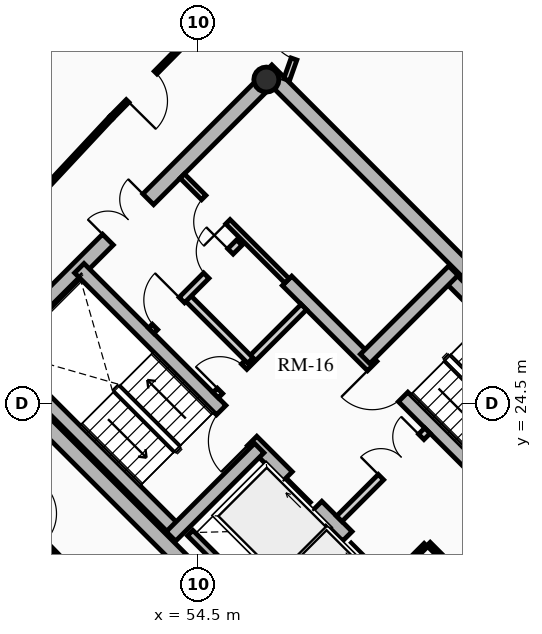
"""IFC4 building model, lengths in metres.
Left out: names, types, materials, properties, quantities, classifications, styles, units other than length and angle.
Written with IfcOpenShell. Run it as: python <this file> out.ifc"""

import sys

from ifc_helpers import new_model, si_unit, direction, frame, frame_2d, origin, origin_2d, place, context, subcontext, project, spatial, rectangle, hollow_circle, extrude, source, transform, mapped, element, fill, save


model = new_model("IFC4")
c1 = context("Model", 3, precision=1e-05, world=origin(), true_north=direction((0.0, 1.0)))
c2 = subcontext(c1, "Body", "Model", "MODEL_VIEW")
j1 = project(units=[si_unit("LENGTHUNIT", "METRE"), si_unit("PLANEANGLEUNIT", "RADIAN")], contexts=[c1])
p1 = place(None, origin())
s1 = spatial("IfcSite", under=j1, at=p1, CompositionType="ELEMENT")
p2 = place(p1, origin())
s2 = spatial("IfcBuilding", under=s1, at=p2, CompositionType="ELEMENT")
p3 = place(p2, frame((0.0, 0.0, 196.66)))
s3 = spatial("IfcBuildingStorey", under=s2, at=p3, CompositionType="ELEMENT", Elevation=196.66)
for number, where, z_axis, x_axis in (
    (1, (58.702, 15.732, 0.0), (0.0, 0.0, 1.0), (-0.707, 0.707, 0.0)),
    (2, (66.268, 23.298, 0.0), (0.0, 0.0, 1.0), (-0.707, 0.707, 0.0)),
):
    element("IfcWall", number, at=place(p3, frame(where, z_axis=z_axis, x_axis=x_axis)), inside=s3, PredefinedType="SHEAR", context=c2, shape_type="SweptSolid", body=[
        extrude(rectangle(XDim=14.1, YDim=0.4, at=frame_2d((7.05, 0.0))), origin(), (0.0, 0.0, 1.0), 2.91),
    ])
p4 = place(p3, frame((58.561, 15.873, 0.0), z_axis=(0.0, 0.0, 1.0), x_axis=(0.707106781187, 0.707106781187, 0.0)))
e3 = element("IfcWall", 3, at=p4, inside=s3, PredefinedType="SHEAR", context=c2, shape_type="SweptSolid", body=[
    extrude(rectangle(XDim=10.7, YDim=0.4, at=frame_2d((5.35, 0.0))), origin(), (0.0, 0.0, 1.0), 2.91),
])
m1 = source(origin(), c2, "Body", "SweptSolid", [
    extrude(rectangle(XDim=1.5, YDim=2.02, at=frame_2d((0.75, 1.01))), frame((0.0, 0.21, 0.0), z_axis=(0.0, -1.0, 0.0), x_axis=(1.0, 0.0, 0.0)), (0.0, 0.0, 1.0), 0.42),
])
p5 = place(p4, frame((5.45, 0.0, 0.0)))
e4 = element("IfcOpeningElement", 4, at=p5, cuts=e3, PredefinedType="OPENING", context=c2, shape_type="MappedRepresentation", body=[
    mapped(m1, transform((0.0, 0.0, 0.0), x_axis=(1.0, 0.0, 0.0), y_axis=(0.0, 1.0, 0.0), z_axis=(0.0, 0.0, 1.0), scale=1.0)),
])
p6 = place(p3, frame((48.873, 25.561, 0.0), z_axis=(0.0, 0.0, 1.0), x_axis=(0.707106781187, 0.707106781187, 0.0)))
e5 = element("IfcWall", 5, at=p6, inside=s3, PredefinedType="SHEAR", context=c2, shape_type="SweptSolid", body=[
    extrude(rectangle(XDim=10.7, YDim=0.4, at=frame_2d((5.35, 0.0))), origin(), (0.0, 0.0, 1.0), 2.91),
])
p7 = place(p6, frame((4.6, 0.0, 0.0)))
e6 = element("IfcOpeningElement", 6, at=p7, cuts=e5, PredefinedType="OPENING", context=c2, shape_type="MappedRepresentation", body=[
    mapped(m1, transform((0.0, 0.0, 0.0), x_axis=(1.0, 0.0, 0.0), y_axis=(0.0, 1.0, 0.0), z_axis=(0.0, 0.0, 1.0), scale=1.0)),
])
p8 = place(p3, frame((61.06, 18.373, 0.0), z_axis=(0.0, 0.0, 1.0), x_axis=(-0.707106781187, 0.707106781187, 0.0)))
e7 = element("IfcWall", 7, at=p8, inside=s3, PredefinedType="SHEAR", context=c2, shape_type="SweptSolid", body=[
    extrude(rectangle(XDim=13.7, YDim=0.35, at=frame_2d((6.85, 0.0))), origin(), (0.0, 0.0, 1.0), 2.91),
])
m2 = source(origin(), c2, "Body", "SweptSolid", [
    extrude(rectangle(XDim=1.1, YDim=2.015, at=frame_2d((0.55, 1.007))), frame((0.0, 0.185, 0.0), z_axis=(0.0, -1.0, 0.0), x_axis=(1.0, 0.0, 0.0)), (0.0, 0.0, 1.0), 0.37),
])
p9 = place(p8, frame((4.85, 0.0, 0.0)))
e8 = element("IfcOpeningElement", 8, at=p9, cuts=e7, PredefinedType="OPENING", context=c2, shape_type="MappedRepresentation", body=[
    mapped(m2, transform((0.0, 0.0, 0.0), x_axis=(1.0, 0.0, 0.0), y_axis=(0.0, 1.0, 0.0), z_axis=(0.0, 0.0, 1.0), scale=1.0)),
])
p10 = place(p8, frame((0.625, 0.0, 0.0)))
e9 = element("IfcOpeningElement", 9, at=p10, cuts=e7, PredefinedType="OPENING", context=c2, shape_type="MappedRepresentation", body=[
    mapped(m2, transform((0.0, 0.0, 0.0), x_axis=(1.0, 0.0, 0.0), y_axis=(0.0, 1.0, 0.0), z_axis=(0.0, 0.0, 1.0), scale=1.0)),
])
p11 = place(p8, frame((2.625, 0.0, 0.0)))
e10 = element("IfcOpeningElement", 10, at=p11, cuts=e7, PredefinedType="OPENING", context=c2, shape_type="MappedRepresentation", body=[
    mapped(m2, transform((0.0, 0.0, 0.0), x_axis=(1.0, 0.0, 0.0), y_axis=(0.0, 1.0, 0.0), z_axis=(0.0, 0.0, 1.0), scale=1.0)),
])
m3 = source(origin(), c2, "Body", "SweptSolid", [
    extrude(rectangle(XDim=1.15, YDim=2.02, at=frame_2d((0.575, 1.01))), frame((0.0, 0.185, 0.0), z_axis=(0.0, -1.0, 0.0), x_axis=(1.0, 0.0, 0.0)), (0.0, 0.0, 1.0), 0.37),
])
p12 = place(p8, frame((7.27, 0.0, 0.0)))
e11 = element("IfcOpeningElement", 11, at=p12, cuts=e7, PredefinedType="OPENING", context=c2, shape_type="MappedRepresentation", body=[
    mapped(m3, transform((0.0, 0.0, 0.0), x_axis=(1.0, 0.0, 0.0), y_axis=(0.0, 1.0, 0.0), z_axis=(0.0, 0.0, 1.0), scale=1.0)),
])
p13 = place(p3, frame((63.627, 20.94, 0.0), z_axis=(0.0, 0.0, 1.0), x_axis=(-0.707119496762, 0.707094065383, 0.0)))
e12 = element("IfcWall", 12, at=p13, inside=s3, PredefinedType="SHEAR", context=c2, shape_type="SweptSolid", body=[
    extrude(rectangle(XDim=9.6, YDim=0.35, at=frame_2d((4.8, 0.0))), origin(), (0.0, 0.0, 1.0), 2.91),
])
p14 = place(p13, frame((5.28, 0.0, 0.0)))
e13 = element("IfcOpeningElement", 13, at=p14, cuts=e12, PredefinedType="OPENING", context=c2, shape_type="MappedRepresentation", body=[
    mapped(m3, transform((0.0, 0.0, 0.0), x_axis=(1.0, 0.0, 0.0), y_axis=(0.0, 1.0, 0.0), z_axis=(0.0, 0.0, 1.0), scale=1.0)),
])
p15 = place(p3, frame((53.922, 21.141, 0.0), z_axis=(0.0, 0.0, 1.0), x_axis=(-0.707106781187, 0.707106781187, 0.0)))
e14 = element("IfcWall", 14, at=p15, inside=s3, PredefinedType="SHEAR", context=c2, shape_type="SweptSolid", body=[
    extrude(rectangle(XDim=6.695, YDim=0.35, at=frame_2d((3.348, 0.0))), origin(), (0.0, 0.0, 1.0), 2.91),
])
p16 = place(p3, frame((53.784, 21.003, 0.0), z_axis=(0.0, 0.0, 1.0), x_axis=(0.707106781187, 0.707106781187, 0.0)))
e15 = element("IfcWall", 15, at=p16, inside=s3, PredefinedType="SHEAR", context=c2, shape_type="SweptSolid", body=[
    extrude(rectangle(XDim=3.285, YDim=0.35, at=frame_2d((1.643, 0.0))), origin(), (0.0, 0.0, 1.0), 2.91),
])
p17 = place(p3, frame((65.812, 23.125, 0.0), z_axis=(0.0, 0.0, 1.0), x_axis=(-0.707106781187, 0.707106781187, 0.0)))
e16 = element("IfcWall", 16, at=p17, inside=s3, PredefinedType="SHEAR", context=c2, shape_type="SweptSolid", body=[
    extrude(rectangle(XDim=6.695, YDim=0.35, at=frame_2d((3.348, 0.0))), origin(), (0.0, 0.0, 1.0), 2.91),
])
p18 = place(p3, frame((58.893, 25.674, 0.0), z_axis=(0.0, 0.0, 1.0), x_axis=(0.707106781187, 0.707106781187, 0.0)))
e17 = element("IfcWall", 17, at=p18, inside=s3, PredefinedType="SHEAR", context=c2, shape_type="SweptSolid", body=[
    extrude(rectangle(XDim=3.285, YDim=0.35, at=frame_2d((1.643, 0.0))), origin(), (0.0, 0.0, 1.0), 2.91),
])
p19 = place(p3, frame((56.294, 33.024, 0.0), z_axis=(0.0, 0.0, 1.0), x_axis=(0.707106781187, 0.707106781187, 0.0)))
e18 = element("IfcColumn", 18, at=p19, inside=s3, PredefinedType="COLUMN", context=c2, shape_type="SweptSolid", body=[
    extrude(hollow_circle(Radius=0.33, WallThickness=0.025, at=origin_2d()), origin(), (0.0, 0.0, 1.0), 2.91),
])
p20 = place(p3, frame((55.888, 19.069, 0.0), z_axis=(0.0, 0.0, 1.0), x_axis=(0.707106781187, 0.707106781187, 0.0)))
e19 = element("IfcWall", 19, at=p20, inside=s3, PredefinedType="SHEAR", context=c2, shape_type="SweptSolid", body=[
    extrude(rectangle(XDim=2.97, YDim=0.2, at=frame_2d((1.485, 0.0))), origin(), (0.0, 0.0, 1.0), 2.91),
])
p21 = place(p3, frame((56.015, 19.366, 0.0), z_axis=(0.0, 0.0, 1.0), x_axis=(-0.707106781187, 0.707106781187, 0.0)))
e20 = element("IfcWall", 20, at=p21, inside=s3, PredefinedType="SHEAR", context=c2, shape_type="SweptSolid", body=[
    extrude(rectangle(XDim=2.44, YDim=0.2, at=frame_2d((1.22, 0.0))), origin(), (0.0, 0.0, 1.0), 2.91),
])
p22 = place(p3, frame((58.214, 21.467, 0.0), z_axis=(0.0, 0.0, 1.0), x_axis=(0.707106781187, 0.707106781187, 0.0)))
e21 = element("IfcWall", 21, at=p22, inside=s3, PredefinedType="PARTITIONING", context=c2, shape_type="SweptSolid", body=[
    extrude(rectangle(XDim=3.28, YDim=0.2, at=frame_2d((1.64, 0.0))), origin(), (0.0, 0.0, 1.0), 2.685),
])
m4 = source(origin(), c2, "Body", "SweptSolid", [
    extrude(rectangle(XDim=1.5, YDim=2.02, at=frame_2d((0.75, 1.01))), frame((0.0, 0.11, 0.0), z_axis=(0.0, -1.0, 0.0), x_axis=(1.0, 0.0, 0.0)), (0.0, 0.0, 1.0), 0.22),
])
p23 = place(p22, frame((1.55, 0.0, 0.0)))
e22 = element("IfcOpeningElement", 22, at=p23, cuts=e21, PredefinedType="OPENING", context=c2, shape_type="MappedRepresentation", body=[
    mapped(m4, transform((0.0, 0.0, 0.0), x_axis=(1.0, 0.0, 0.0), y_axis=(0.0, 1.0, 0.0), z_axis=(0.0, 0.0, 1.0), scale=1.0)),
])
p24 = place(p3, frame((54.961, 24.719, 0.0), z_axis=(0.0, 0.0, 1.0), x_axis=(0.707106781187, 0.707106781187, 0.0)))
e23 = element("IfcWall", 23, at=p24, inside=s3, PredefinedType="PARTITIONING", context=c2, shape_type="SweptSolid", body=[
    extrude(rectangle(XDim=3.28, YDim=0.2, at=frame_2d((1.64, 0.0))), origin(), (0.0, 0.0, 1.0), 2.685),
])
m5 = source(origin(), c2, "Body", "SweptSolid", [
    extrude(rectangle(XDim=0.9, YDim=2.005, at=frame_2d((0.45, 1.002))), frame((0.0, 0.11, 0.0), z_axis=(0.0, -1.0, 0.0), x_axis=(1.0, 0.0, 0.0)), (0.0, 0.0, 1.0), 0.22),
])
p25 = place(p24, frame((0.16, 0.0, 0.0)))
e24 = element("IfcOpeningElement", 24, at=p25, cuts=e23, PredefinedType="OPENING", context=c2, shape_type="MappedRepresentation", body=[
    mapped(m5, transform((0.0, 0.0, 0.0), x_axis=(1.0, 0.0, 0.0), y_axis=(0.0, 1.0, 0.0), z_axis=(0.0, 0.0, 1.0), scale=1.0)),
])
p26 = place(p3, frame((55.874, 25.631, 0.0), z_axis=(0.0, 0.0, 1.0), x_axis=(-0.707157639372, 0.707055919343, 0.0)))
e25 = element("IfcWall", 25, at=p26, inside=s3, PredefinedType="PARTITIONING", context=c2, shape_type="SweptSolid", body=[
    extrude(rectangle(XDim=2.4, YDim=0.2, at=frame_2d((1.2, 0.0))), origin(), (0.0, 0.0, 1.0), 2.685),
])
p27 = place(p3, frame((53.264, 26.416, 0.0), z_axis=(0.0, 0.0, 1.0), x_axis=(0.707106781187, 0.707106781187, 0.0)))
e26 = element("IfcWall", 26, at=p27, inside=s3, PredefinedType="PARTITIONING", context=c2, shape_type="SweptSolid", body=[
    extrude(rectangle(XDim=3.28, YDim=0.2, at=frame_2d((1.64, 0.0))), origin(), (0.0, 0.0, 1.0), 2.685),
])
m6 = source(origin(), c2, "Body", "SweptSolid", [
    extrude(rectangle(XDim=1.0, YDim=2.015, at=frame_2d((0.5, 1.007))), frame((0.0, 0.11, 0.0), z_axis=(0.0, -1.0, 0.0), x_axis=(1.0, 0.0, 0.0)), (0.0, 0.0, 1.0), 0.22),
])
p28 = place(p27, frame((0.14, 0.0, 0.0)))
e27 = element("IfcOpeningElement", 27, at=p28, cuts=e26, PredefinedType="OPENING", context=c2, shape_type="MappedRepresentation", body=[
    mapped(m6, transform((0.0, 0.0, 0.0), x_axis=(1.0, 0.0, 0.0), y_axis=(0.0, 1.0, 0.0), z_axis=(0.0, 0.0, 1.0), scale=1.0)),
])
p29 = place(p27, frame((2.05, 0.0, 0.0)))
e28 = element("IfcOpeningElement", 28, at=p29, cuts=e26, PredefinedType="OPENING", context=c2, shape_type="MappedRepresentation", body=[
    mapped(m5, transform((0.0, 0.0, 0.0), x_axis=(1.0, 0.0, 0.0), y_axis=(0.0, 1.0, 0.0), z_axis=(0.0, 0.0, 1.0), scale=1.0)),
])
p30 = place(p3, frame((61.835, 19.529, 0.0), z_axis=(0.0, 0.0, 1.0), x_axis=(-0.707174592913, 0.707038962956, 0.0)))
e29 = element("IfcWall", 29, at=p30, inside=s3, PredefinedType="PARTITIONING", context=c2, shape_type="SweptSolid", body=[
    extrude(rectangle(XDim=1.8, YDim=0.125, at=frame_2d((0.9, 0.0))), origin(), (0.0, 0.0, 1.0), 2.685),
])
m7 = source(origin(), c2, "Body", "SweptSolid", [
    extrude(rectangle(XDim=0.9, YDim=2.005, at=frame_2d((0.45, 1.002))), frame((0.0, 0.073, 0.0), z_axis=(0.0, -1.0, 0.0), x_axis=(1.0, 0.0, 0.0)), (0.0, 0.0, 1.0), 0.145),
])
p31 = place(p30, frame((0.42, 0.0, 0.0)))
e30 = element("IfcOpeningElement", 30, at=p31, cuts=e29, PredefinedType="OPENING", context=c2, shape_type="MappedRepresentation", body=[
    mapped(m7, transform((0.0, 0.0, 0.0), x_axis=(1.0, 0.0, 0.0), y_axis=(0.0, 1.0, 0.0), z_axis=(0.0, 0.0, 1.0), scale=1.0)),
])
p32 = place(p3, frame((59.713, 19.996, 0.0), z_axis=(0.0, 0.0, 1.0), x_axis=(0.707217726, 0.706995818963, 0.0)))
e31 = element("IfcWall", 31, at=p32, inside=s3, PredefinedType="PARTITIONING", context=c2, shape_type="SweptSolid", body=[
    extrude(rectangle(XDim=1.1, YDim=0.125, at=frame_2d((0.55, 0.0))), origin(), (0.0, 0.0, 1.0), 2.685),
])
p33 = place(p3, frame((56.839, 27.728, 0.0), z_axis=(0.0, 0.0, 1.0), x_axis=(-0.707106781187, 0.707106781187, 0.0)))
e32 = element("IfcWall", 32, at=p33, inside=s3, PredefinedType="PARTITIONING", context=c2, shape_type="SweptSolid", body=[
    extrude(rectangle(XDim=3.9, YDim=0.16, at=frame_2d((1.95, 0.0))), origin(), (0.0, 0.0, 1.0), 2.685),
])
m8 = source(origin(), c2, "Body", "SweptSolid", [
    extrude(rectangle(XDim=0.9, YDim=2.005, at=frame_2d((0.45, 1.002))), frame((0.0, 0.09, 0.0), z_axis=(0.0, -1.0, 0.0), x_axis=(1.0, 0.0, 0.0)), (0.0, 0.0, 1.0), 0.18),
])
p34 = place(p33, frame((2.2, 0.0, 0.0)))
e33 = element("IfcOpeningElement", 33, at=p34, cuts=e32, PredefinedType="OPENING", context=c2, shape_type="MappedRepresentation", body=[
    mapped(m8, transform((0.0, 0.0, 0.0), x_axis=(1.0, 0.0, 0.0), y_axis=(0.0, 1.0, 0.0), z_axis=(0.0, 0.0, 1.0), scale=1.0)),
])
p35 = place(p3, frame((54.506, 34.344, 0.0), z_axis=(0.0, 0.0, 1.0), x_axis=(-0.703053402247, -0.711137056824, 0.0)))
e34 = element("IfcWall", 34, at=p35, inside=s3, PredefinedType="MOVABLE", context=c2, shape_type="SweptSolid", body=[
    extrude(rectangle(XDim=3.262, YDim=0.1, at=frame_2d((1.631, 0.0))), origin(), (0.0, 0.0, 1.0), 2.322),
])
m9 = source(origin(), c2, "Body", "SweptSolid", [
    extrude(rectangle(XDim=1.05, YDim=2.015, at=frame_2d((0.525, 1.007))), frame((0.0, 0.06, 0.0), z_axis=(0.0, -1.0, 0.0), x_axis=(1.0, 0.0, 0.0)), (0.0, 0.0, 1.0), 0.12),
])
p36 = place(p35, frame((1.599, 0.0, 0.0)))
e35 = element("IfcOpeningElement", 35, at=p36, cuts=e34, PredefinedType="OPENING", context=c2, shape_type="MappedRepresentation", body=[
    mapped(m9, transform((0.0, 0.0, 0.0), x_axis=(1.0, 0.0, 0.0), y_axis=(0.0, 1.0, 0.0), z_axis=(0.0, 0.0, 1.0), scale=1.0)),
])
p37 = place(p3, frame((52.212, 32.024, 0.0), z_axis=(0.0, 0.0, 1.0), x_axis=(-0.682158998173, -0.731203871169, 0.0)))
e36 = element("IfcWall", 36, at=p37, inside=s3, PredefinedType="MOVABLE", context=c2, shape_type="SweptSolid", body=[
    extrude(rectangle(XDim=6.282, YDim=0.1, at=frame_2d((3.141, 0.0))), origin(), (0.0, 0.0, 1.0), 2.255),
])
p38 = place(p3, frame((48.052, 23.323, 0.0), z_axis=(0.0, 0.0, 1.0), x_axis=(0.696573981306, -0.717484974454, 0.0)))
e37 = element("IfcWall", 37, at=p38, inside=s3, PredefinedType="MOVABLE", context=c2, shape_type="SweptSolid", body=[
    extrude(rectangle(XDim=5.849, YDim=0.1, at=frame_2d((2.925, 0.0))), origin(), (0.0, 0.0, 1.0), 2.685),
])
p39 = place(p38, frame((2.4, 0.0, 0.0)))
e38 = element("IfcOpeningElement", 38, at=p39, cuts=e37, PredefinedType="OPENING", context=c2, shape_type="MappedRepresentation", body=[
    mapped(m9, transform((0.0, 0.0, 0.0), x_axis=(1.0, 0.0, 0.0), y_axis=(0.0, 1.0, 0.0), z_axis=(0.0, 0.0, 1.0), scale=1.0)),
])
p40 = place(p3, frame((56.828, 33.021, 0.0), z_axis=(0.0, 0.0, 1.0), x_axis=(0.334788446034, 0.942293317605, 0.0)))
e39 = element("IfcWall", 39, at=p40, inside=s3, PredefinedType="PARTITIONING", context=c2, shape_type="SweptSolid", body=[
    extrude(rectangle(XDim=1.829, YDim=0.16, at=frame_2d((0.915, 0.0))), origin(), (0.0, 0.0, 1.0), 2.255),
])
m10 = source(origin(), c2, "Body", "SweptSolid", [
    extrude(rectangle(XDim=1.05, YDim=2.015, at=frame_2d((0.525, 1.007))), frame((0.0, 0.09, 0.0), z_axis=(0.0, -1.0, 0.0), x_axis=(1.0, 0.0, 0.0)), (0.0, 0.0, 1.0), 0.18),
])
p41 = place(p40, frame((0.579, 0.0, 0.0)))
e40 = element("IfcOpeningElement", 40, at=p41, cuts=e39, PredefinedType="OPENING", context=c2, shape_type="MappedRepresentation", body=[
    mapped(m10, transform((0.0, 0.0, 0.0), x_axis=(1.0, 0.0, 0.0), y_axis=(0.0, 1.0, 0.0), z_axis=(0.0, 0.0, 1.0), scale=1.0)),
])
m11 = source(origin(), c2, "Body", "SweptSolid", [
    extrude(rectangle(XDim=1.1, YDim=2.015, at=frame_2d((0.55, 1.007))), frame((0.0, 0.025, 0.0), z_axis=(0.0, -1.0, 0.0), x_axis=(1.0, 0.0, 0.0)), (0.0, 0.0, 1.0), 0.05),
])
p42 = place(p9, origin())
e41 = element("IfcDoor", 41, at=p42, inside=s3, OperationType="SLIDING_TO_RIGHT", PredefinedType="DOOR", context=c2, shape_type="MappedRepresentation", body=[
    mapped(m11, transform((0.0, 0.0, 0.0), x_axis=(1.0, 0.0, 0.0), y_axis=(0.0, 1.0, 0.0), z_axis=(0.0, 0.0, 1.0), scale=1.0)),
])
fill(e8, e41)
p43 = place(p11, origin())
e42 = element("IfcDoor", 42, at=p43, inside=s3, OperationType="SLIDING_TO_LEFT", PredefinedType="DOOR", context=c2, shape_type="MappedRepresentation", body=[
    mapped(m11, transform((0.0, 0.0, 0.0), x_axis=(1.0, 0.0, 0.0), y_axis=(0.0, 1.0, 0.0), z_axis=(0.0, 0.0, 1.0), scale=1.0)),
])
fill(e10, e42)
m12 = source(origin(), c2, "Body", "SweptSolid", [
    extrude(rectangle(XDim=1.15, YDim=2.02, at=frame_2d((0.575, 1.01))), frame((0.0, 0.025, 0.0), z_axis=(0.0, -1.0, 0.0), x_axis=(1.0, 0.0, 0.0)), (0.0, 0.0, 1.0), 0.05),
])
p44 = place(p12, origin())
e43 = element("IfcDoor", 43, at=p44, inside=s3, OperationType="SINGLE_SWING_LEFT", PredefinedType="DOOR", context=c2, shape_type="MappedRepresentation", body=[
    mapped(m12, transform((0.0, 0.0, 0.0), x_axis=(1.0, 0.0, 0.0), y_axis=(0.0, 1.0, 0.0), z_axis=(0.0, 0.0, 1.0), scale=1.0)),
])
fill(e11, e43)
p45 = place(p14, origin())
e44 = element("IfcDoor", 44, at=p45, inside=s3, OperationType="SINGLE_SWING_RIGHT", PredefinedType="DOOR", context=c2, shape_type="MappedRepresentation", body=[
    mapped(m12, transform((0.0, 0.0, 0.0), x_axis=(1.0, 0.0, 0.0), y_axis=(0.0, 1.0, 0.0), z_axis=(0.0, 0.0, 1.0), scale=1.0)),
])
fill(e13, e44)
m13 = source(origin(), c2, "Body", "SweptSolid", [
    extrude(rectangle(XDim=1.5, YDim=2.02, at=frame_2d((0.75, 1.01))), frame((0.0, 0.025, 0.0), z_axis=(0.0, -1.0, 0.0), x_axis=(1.0, 0.0, 0.0)), (0.0, 0.0, 1.0), 0.05),
])
p46 = place(p7, origin())
e45 = element("IfcDoor", 45, at=p46, inside=s3, OperationType="DOUBLE_DOOR_SINGLE_SWING", PredefinedType="DOOR", context=c2, shape_type="MappedRepresentation", body=[
    mapped(m13, transform((0.0, 0.0, 0.0), x_axis=(1.0, 0.0, 0.0), y_axis=(0.0, 1.0, 0.0), z_axis=(0.0, 0.0, 1.0), scale=1.0)),
])
fill(e6, e45)
p47 = place(p23, origin())
e46 = element("IfcDoor", 46, at=p47, inside=s3, OperationType="DOUBLE_DOOR_SINGLE_SWING", PredefinedType="DOOR", context=c2, shape_type="MappedRepresentation", body=[
    mapped(m13, transform((0.0, 0.0, 0.0), x_axis=(1.0, 0.0, 0.0), y_axis=(0.0, 1.0, 0.0), z_axis=(0.0, 0.0, 1.0), scale=1.0)),
])
fill(e22, e46)
m14 = source(origin(), c2, "Body", "SweptSolid", [
    extrude(rectangle(XDim=0.9, YDim=2.005, at=frame_2d((0.45, 1.002))), frame((0.0, 0.025, 0.0), z_axis=(0.0, -1.0, 0.0), x_axis=(1.0, 0.0, 0.0)), (0.0, 0.0, 1.0), 0.05),
])
p48 = place(p25, origin())
e47 = element("IfcDoor", 47, at=p48, inside=s3, OperationType="SINGLE_SWING_LEFT", PredefinedType="DOOR", context=c2, shape_type="MappedRepresentation", body=[
    mapped(m14, transform((0.0, 0.0, 0.0), x_axis=(1.0, 0.0, 0.0), y_axis=(0.0, 1.0, 0.0), z_axis=(0.0, 0.0, 1.0), scale=1.0)),
])
fill(e24, e47)
m15 = source(origin(), c2, "Body", "SweptSolid", [
    extrude(rectangle(XDim=1.0, YDim=2.015, at=frame_2d((0.5, 1.007))), frame((0.0, 0.025, 0.0), z_axis=(0.0, -1.0, 0.0), x_axis=(1.0, 0.0, 0.0)), (0.0, 0.0, 1.0), 0.05),
])
p49 = place(p28, origin())
e48 = element("IfcDoor", 48, at=p49, inside=s3, OperationType="SINGLE_SWING_RIGHT", PredefinedType="DOOR", context=c2, shape_type="MappedRepresentation", body=[
    mapped(m15, transform((0.0, 0.0, 0.0), x_axis=(1.0, 0.0, 0.0), y_axis=(0.0, 1.0, 0.0), z_axis=(0.0, 0.0, 1.0), scale=1.0)),
])
fill(e27, e48)
p50 = place(p29, origin())
e49 = element("IfcDoor", 49, at=p50, inside=s3, OperationType="SINGLE_SWING_RIGHT", PredefinedType="DOOR", context=c2, shape_type="MappedRepresentation", body=[
    mapped(m14, transform((0.0, 0.0, 0.0), x_axis=(1.0, 0.0, 0.0), y_axis=(0.0, 1.0, 0.0), z_axis=(0.0, 0.0, 1.0), scale=1.0)),
])
fill(e28, e49)
p51 = place(p34, origin())
e50 = element("IfcDoor", 50, at=p51, inside=s3, OperationType="SINGLE_SWING_LEFT", PredefinedType="DOOR", context=c2, shape_type="MappedRepresentation", body=[
    mapped(m14, transform((0.0, 0.0, 0.0), x_axis=(1.0, 0.0, 0.0), y_axis=(0.0, 1.0, 0.0), z_axis=(0.0, 0.0, 1.0), scale=1.0)),
])
fill(e33, e50)
m16 = source(origin(), c2, "Body", "SweptSolid", [
    extrude(rectangle(XDim=1.05, YDim=2.015, at=frame_2d((0.525, 1.007))), frame((0.0, 0.025, 0.0), z_axis=(0.0, -1.0, 0.0), x_axis=(1.0, 0.0, 0.0)), (0.0, 0.0, 1.0), 0.05),
])
p52 = place(p41, origin())
e51 = element("IfcDoor", 51, at=p52, inside=s3, OperationType="SINGLE_SWING_RIGHT", PredefinedType="DOOR", context=c2, shape_type="MappedRepresentation", body=[
    mapped(m16, transform((0.0, 0.0, 0.0), x_axis=(1.0, 0.0, 0.0), y_axis=(0.0, 1.0, 0.0), z_axis=(0.0, 0.0, 1.0), scale=1.0)),
])
fill(e40, e51)
p53 = place(p36, origin())
e52 = element("IfcDoor", 52, at=p53, inside=s3, OperationType="SINGLE_SWING_RIGHT", PredefinedType="DOOR", context=c2, shape_type="MappedRepresentation", body=[
    mapped(m16, transform((0.0, 0.0, 0.0), x_axis=(1.0, 0.0, 0.0), y_axis=(0.0, 1.0, 0.0), z_axis=(0.0, 0.0, 1.0), scale=1.0)),
])
fill(e35, e52)
save(model, sys.argv[1])
